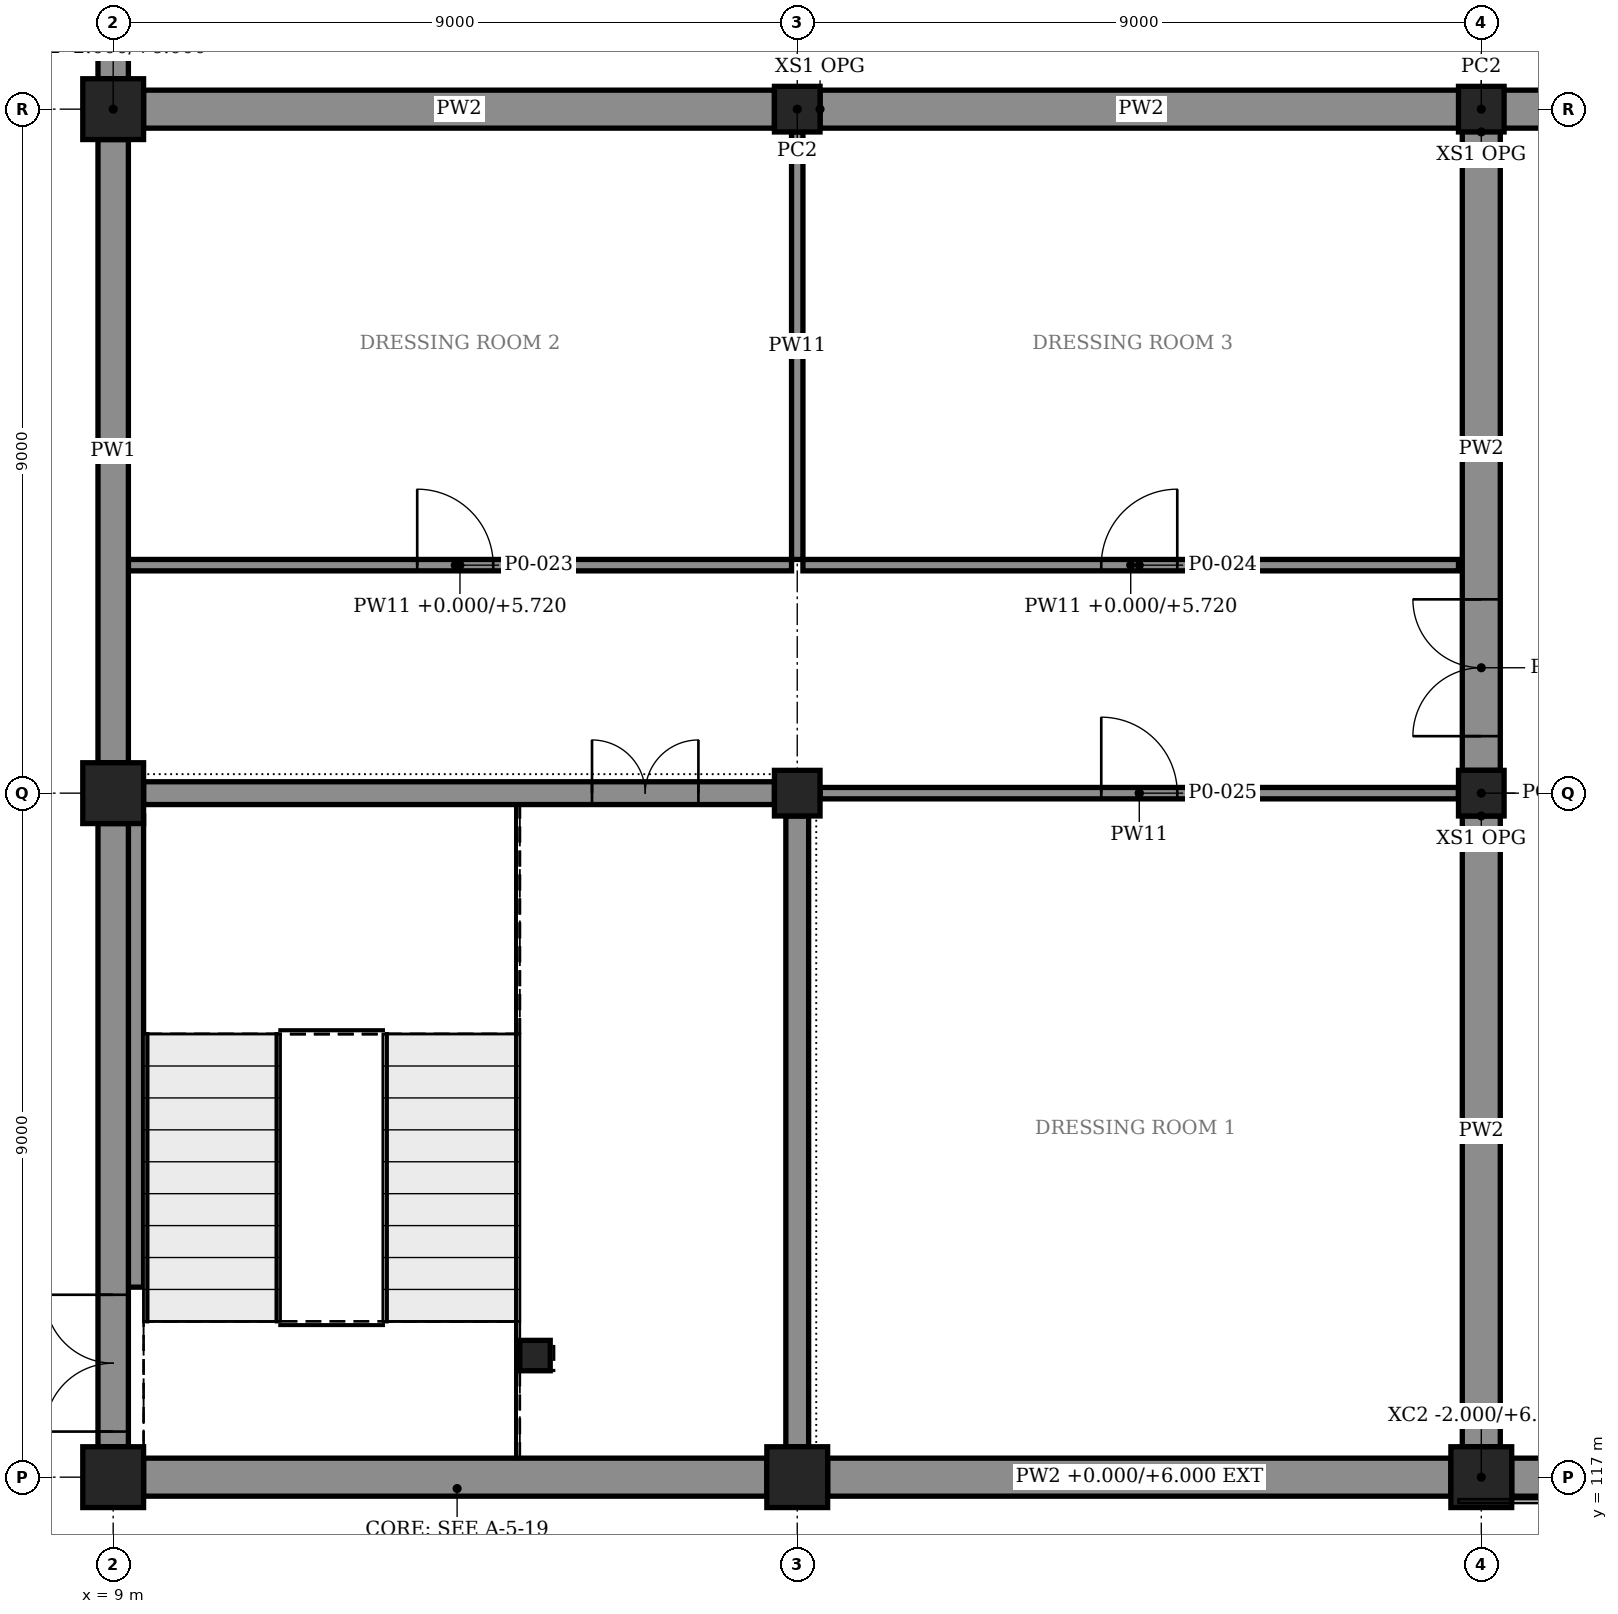
"""IFC4 building model, lengths in metres.
Left out: names, types, materials, properties, quantities, classifications, styles, units other than length and angle.
Written with IfcOpenShell. Run it as: python <this file> out.ifc"""

import sys

from ifc_helpers import new_model, si_unit, direction, frame, frame_2d, origin, origin_2d, place, context, subcontext, project, spatial, polyline, rectangle, outline, extrude, element, fill, save


model = new_model("IFC4")
c1 = context("Model", 3, precision=1e-05, world=origin(), true_north=direction((0.0, 1.0)))
c2 = subcontext(c1, "Body", "Model", "MODEL_VIEW")
j1 = project(units=[si_unit("LENGTHUNIT", "METRE"), si_unit("PLANEANGLEUNIT", "RADIAN")], contexts=[c1])
p1 = place(None, origin())
s1 = spatial("IfcSite", under=j1, at=p1, CompositionType="ELEMENT")
p2 = place(p1, origin())
s2 = spatial("IfcBuilding", under=s1, at=p2, CompositionType="ELEMENT")
p3 = place(p2, origin())
s3 = spatial("IfcBuildingStorey", under=s2, at=p3, CompositionType="ELEMENT", Elevation=0.0)
for number, where, z_axis, x_axis in (
    (1, (9.0, 117.0, -2.0), (0.0, 0.0, 1.0), (1.0, 0.0, 0.0)),
    (2, (18.0, 117.0, -2.0), (0.0, 0.0, 1.0), (1.0, 0.0, 0.0)),
    (3, (27.0, 117.0, -2.0), (0.0, 0.0, 1.0), (1.0, 0.0, 0.0)),
    (4, (9.0, 126.0, -2.0), (0.0, 0.0, 1.0), (1.0, 0.0, 0.0)),
):
    element("IfcColumn", number, at=place(p3, frame(where, z_axis=z_axis, x_axis=x_axis)), inside=s3, PredefinedType="COLUMN", context=c2, shape_type="SweptSolid", body=[
        extrude(rectangle(XDim=0.8, YDim=0.8, at=origin_2d()), origin(), (0.0, 0.0, 1.0), 8.0),
    ])
for number, where, z_axis, x_axis in (
    (5, (18.0, 126.0, -2.0), (0.0, 0.0, 1.0), (1.0, 0.0, 0.0)),
    (6, (27.0, 126.0, -2.0), (0.0, 0.0, 1.0), (1.0, 0.0, 0.0)),
):
    element("IfcColumn", number, at=place(p3, frame(where, z_axis=z_axis, x_axis=x_axis)), inside=s3, PredefinedType="COLUMN", context=c2, shape_type="SweptSolid", body=[
        extrude(rectangle(XDim=0.6, YDim=0.6, at=origin_2d()), origin(), (0.0, 0.0, 1.0), 8.0),
    ])
p4 = place(p3, frame((9.0, 135.0, -2.0), z_axis=(0.0, 0.0, 1.0), x_axis=(1.0, 0.0, 0.0)))
e7 = element("IfcColumn", 7, at=p4, inside=s3, PredefinedType="COLUMN", context=c2, shape_type="SweptSolid", body=[
    extrude(rectangle(XDim=0.8, YDim=0.8, at=origin_2d()), origin(), (0.0, 0.0, 1.0), 8.0),
])
for number, where, z_axis, x_axis in (
    (8, (18.0, 135.0, -2.0), (0.0, 0.0, 1.0), (1.0, 0.0, 0.0)),
    (9, (27.0, 135.0, -2.0), (0.0, 0.0, 1.0), (1.0, 0.0, 0.0)),
):
    element("IfcColumn", number, at=place(p3, frame(where, z_axis=z_axis, x_axis=x_axis)), inside=s3, PredefinedType="COLUMN", context=c2, shape_type="SweptSolid", body=[
        extrude(rectangle(XDim=0.6, YDim=0.6, at=origin_2d()), origin(), (0.0, 0.0, 1.0), 8.0),
    ])
p5 = place(p3, frame((14.55, 118.6, -0.3), z_axis=(0.0, 0.0, 1.0), x_axis=(1.0, 0.0, 0.0)))
e10 = element("IfcColumn", 10, at=p5, inside=s3, PredefinedType="COLUMN", context=c2, shape_type="SweptSolid", body=[
    extrude(rectangle(XDim=0.4, YDim=0.4, at=origin_2d()), origin(), (0.0, 0.0, 1.0), 6.3),
])
p6 = place(p3, frame((9.0, 117.4, 0.0), z_axis=(0.0, 0.0, 1.0), x_axis=(0.0, 1.0, 0.0)))
e11 = element("IfcWall", 11, at=p6, inside=s3, PredefinedType="SOLIDWALL", context=c2, shape_type="SweptSolid", body=[
    extrude(rectangle(XDim=8.2, YDim=0.4, at=frame_2d((4.1, 0.0))), origin(), (0.0, 0.0, 1.0), 6.0),
])
p7 = place(p6, frame((0.2, 0.0, 0.0)))
e12 = element("IfcOpeningElement", 12, at=p7, cuts=e11, PredefinedType="OPENING", context=c2, shape_type="SweptSolid", body=[
    extrude(rectangle(XDim=1.8, YDim=2.4, at=frame_2d((0.9, 1.2))), frame((0.0, 0.21, 0.0), z_axis=(0.0, -1.0, 0.0), x_axis=(1.0, 0.0, 0.0)), (0.0, 0.0, 1.0), 0.42),
])
p8 = place(p3, frame((9.0, 126.4, 0.0), z_axis=(0.0, 0.0, 1.0), x_axis=(0.0, 1.0, 0.0)))
e13 = element("IfcWall", 13, at=p8, inside=s3, PredefinedType="SOLIDWALL", context=c2, shape_type="SweptSolid", body=[
    extrude(rectangle(XDim=8.2, YDim=0.4, at=frame_2d((4.1, 0.0))), origin(), (0.0, 0.0, 1.0), 6.0),
])
p9 = place(p3, frame((9.0, 135.4, -1.2), z_axis=(0.0, 0.0, 1.0), x_axis=(0.0, 1.0, 0.0)))
e14 = element("IfcWall", 14, at=p9, inside=s3, PredefinedType="SOLIDWALL", context=c2, shape_type="SweptSolid", body=[
    extrude(rectangle(XDim=8.2, YDim=0.4, at=frame_2d((4.1, 0.0))), origin(), (0.0, 0.0, 1.0), 7.2),
])
for number, where, z_axis, x_axis in (
    (15, (9.4, 117.0, 0.0), (0.0, 0.0, 1.0), (1.0, 0.0, 0.0)),
    (16, (18.4, 117.0, 0.0), (0.0, 0.0, 1.0), (1.0, 0.0, 0.0)),
):
    element("IfcWall", number, at=place(p3, frame(where, z_axis=z_axis, x_axis=x_axis)), inside=s3, PredefinedType="SOLIDWALL", context=c2, shape_type="SweptSolid", body=[
        extrude(rectangle(XDim=8.2, YDim=0.5, at=frame_2d((4.1, 0.0))), origin(), (0.0, 0.0, 1.0), 6.0),
    ])
p10 = place(p3, frame((27.4, 117.0, 0.0), z_axis=(0.0, 0.0, 1.0), x_axis=(1.0, 0.0, 0.0)))
e17 = element("IfcWall", 17, at=p10, inside=s3, PredefinedType="SOLIDWALL", context=c2, shape_type="SweptSolid", body=[
    extrude(rectangle(XDim=8.2, YDim=0.5, at=frame_2d((4.1, 0.0))), origin(), (0.0, 0.0, 1.0), 6.0),
])
p11 = place(p10, frame((1.7, 0.0, 0.0)))
e18 = element("IfcOpeningElement", 18, at=p11, cuts=e17, PredefinedType="OPENING", context=c2, shape_type="SweptSolid", body=[
    extrude(rectangle(XDim=4.8, YDim=4.5, at=frame_2d((2.4, 2.25))), frame((0.0, 0.26, 0.0), z_axis=(0.0, -1.0, 0.0), x_axis=(1.0, 0.0, 0.0)), (0.0, 0.0, 1.0), 0.52),
])
p12 = place(p3, frame((9.4, 135.0, 0.0), z_axis=(0.0, 0.0, 1.0), x_axis=(1.0, 0.0, 0.0)))
e19 = element("IfcWall", 19, at=p12, inside=s3, PredefinedType="SOLIDWALL", context=c2, shape_type="SweptSolid", body=[
    extrude(rectangle(XDim=8.3, YDim=0.5, at=frame_2d((4.15, 0.0))), origin(), (0.0, 0.0, 1.0), 4.82),
])
p13 = place(p3, frame((18.3, 135.0, 0.0), z_axis=(0.0, 0.0, 1.0), x_axis=(1.0, 0.0, 0.0)))
e20 = element("IfcWall", 20, at=p13, inside=s3, PredefinedType="SOLIDWALL", context=c2, shape_type="SweptSolid", body=[
    extrude(rectangle(XDim=8.45, YDim=0.5, at=frame_2d((4.225, 0.0))), origin(), (0.0, 0.0, 1.0), 4.82),
])
p14 = place(p3, frame((26.75, 135.0, 0.0), z_axis=(0.0, 0.0, 1.0), x_axis=(1.0, 0.0, 0.0)))
e21 = element("IfcWall", 21, at=p14, inside=s3, PredefinedType="SOLIDWALL", context=c2, shape_type="SweptSolid", body=[
    extrude(outline(polyline([(0.0, 0.0), (27.5, 0.0), (27.5, 21.9), (27.25, 22.04), (18.25, 23.183), (9.25, 23.183), (0.25, 22.04), (0.0, 21.9), (0.0, 0.0)])), frame((0.0, 0.25, 0.0), z_axis=(0.0, -1.0, 0.0), x_axis=(1.0, 0.0, 0.0)), (0.0, 0.0, 1.0), 0.5),
])
p15 = place(p14, frame((4.75, 0.0, 0.0)))
e22 = element("IfcOpeningElement", 22, at=p15, cuts=e21, PredefinedType="OPENING", context=c2, shape_type="SweptSolid", body=[
    extrude(rectangle(XDim=18.0, YDim=9.0, at=frame_2d((9.0, 4.5))), frame((0.0, 0.26, 0.0), z_axis=(0.0, -1.0, 0.0), x_axis=(1.0, 0.0, 0.0)), (0.0, 0.0, 1.0), 0.52),
])
p16 = place(p3, frame((27.0, 117.4, 0.0), z_axis=(0.0, 0.0, 1.0), x_axis=(0.0, 1.0, 0.0)))
e23 = element("IfcWall", 23, at=p16, inside=s3, PredefinedType="SOLIDWALL", context=c2, shape_type="SweptSolid", body=[
    extrude(rectangle(XDim=8.3, YDim=0.5, at=frame_2d((4.15, 0.0))), origin(), (0.0, 0.0, 1.0), 4.82),
])
p17 = place(p3, frame((27.0, 126.3, 0.0), z_axis=(0.0, 0.0, 1.0), x_axis=(0.0, 1.0, 0.0)))
e24 = element("IfcWall", 24, at=p17, inside=s3, PredefinedType="SOLIDWALL", context=c2, shape_type="SweptSolid", body=[
    extrude(rectangle(XDim=8.45, YDim=0.5, at=frame_2d((4.225, 0.0))), origin(), (0.0, 0.0, 1.0), 4.82),
])
p18 = place(p17, frame((0.45, 0.0, 0.0)))
e25 = element("IfcOpeningElement", 25, at=p18, cuts=e24, PredefinedType="OPENING", context=c2, shape_type="SweptSolid", body=[
    extrude(rectangle(XDim=1.8, YDim=2.4, at=frame_2d((0.9, 1.2))), frame((0.0, 0.26, 0.0), z_axis=(0.0, -1.0, 0.0), x_axis=(1.0, 0.0, 0.0)), (0.0, 0.0, 1.0), 0.52),
])
p19 = place(p3, frame((18.0, 117.4, 0.0), z_axis=(0.0, 0.0, 1.0), x_axis=(0.0, 1.0, 0.0)))
e26 = element("IfcWall", 26, at=p19, inside=s3, PredefinedType="SOLIDWALL", context=c2, shape_type="SweptSolid", body=[
    extrude(rectangle(XDim=8.3, YDim=0.3, at=frame_2d((4.15, 0.0))), origin(), (0.0, 0.0, 1.0), 4.82),
])
p20 = place(p3, frame((9.4, 126.0, 0.0), z_axis=(0.0, 0.0, 1.0), x_axis=(1.0, 0.0, 0.0)))
e27 = element("IfcWall", 27, at=p20, inside=s3, PredefinedType="SOLIDWALL", context=c2, shape_type="SweptSolid", body=[
    extrude(rectangle(XDim=8.3, YDim=0.3, at=frame_2d((4.15, 0.0))), origin(), (0.0, 0.0, 1.0), 4.82),
])
p21 = place(p20, frame((5.9, 0.0, 0.0)))
e28 = element("IfcOpeningElement", 28, at=p21, cuts=e27, PredefinedType="OPENING", context=c2, shape_type="SweptSolid", body=[
    extrude(rectangle(XDim=1.4, YDim=2.4, at=frame_2d((0.7, 1.2))), frame((0.0, 0.16, 0.0), z_axis=(0.0, -1.0, 0.0), x_axis=(1.0, 0.0, 0.0)), (0.0, 0.0, 1.0), 0.32),
])
p22 = place(p3, frame((9.3, 119.5, 0.0), z_axis=(0.0, 0.0, 1.0), x_axis=(0.0, 1.0, 0.0)))
e29 = element("IfcWall", 29, at=p22, inside=s3, PredefinedType="SOLIDWALL", context=c2, shape_type="SweptSolid", body=[
    extrude(rectangle(XDim=6.2, YDim=0.2, at=frame_2d((3.1, 0.0))), origin(), (0.0, 0.0, 1.0), 5.72),
])
p23 = place(p3, frame((9.2, 129.0, 0.0), z_axis=(0.0, 0.0, 1.0), x_axis=(1.0, 0.0, 0.0)))
e30 = element("IfcWall", 30, at=p23, inside=s3, PredefinedType="PARTITIONING", context=c2, shape_type="SweptSolid", body=[
    extrude(rectangle(XDim=8.725, YDim=0.15, at=frame_2d((4.363, 0.0))), origin(), (0.0, 0.0, 1.0), 5.72),
])
p24 = place(p23, frame((3.8, 0.0, 0.0)))
e31 = element("IfcOpeningElement", 31, at=p24, cuts=e30, PredefinedType="OPENING", context=c2, shape_type="SweptSolid", body=[
    extrude(rectangle(XDim=1.0, YDim=2.4, at=frame_2d((0.5, 1.2))), frame((0.0, 0.085, 0.0), z_axis=(0.0, -1.0, 0.0), x_axis=(1.0, 0.0, 0.0)), (0.0, 0.0, 1.0), 0.17),
])
p25 = place(p3, frame((18.075, 129.0, 0.0), z_axis=(0.0, 0.0, 1.0), x_axis=(1.0, 0.0, 0.0)))
e32 = element("IfcWall", 32, at=p25, inside=s3, PredefinedType="PARTITIONING", context=c2, shape_type="SweptSolid", body=[
    extrude(rectangle(XDim=8.625, YDim=0.15, at=frame_2d((4.312, 0.0))), origin(), (0.0, 0.0, 1.0), 5.72),
])
p26 = place(p25, frame((3.925, 0.0, 0.0)))
e33 = element("IfcOpeningElement", 33, at=p26, cuts=e32, PredefinedType="OPENING", context=c2, shape_type="SweptSolid", body=[
    extrude(rectangle(XDim=1.0, YDim=2.4, at=frame_2d((0.5, 1.2))), frame((0.0, 0.085, 0.0), z_axis=(0.0, -1.0, 0.0), x_axis=(1.0, 0.0, 0.0)), (0.0, 0.0, 1.0), 0.17),
])
p27 = place(p3, frame((18.0, 129.075, 0.0), z_axis=(0.0, 0.0, 1.0), x_axis=(0.0, 1.0, 0.0)))
e34 = element("IfcWall", 34, at=p27, inside=s3, PredefinedType="PARTITIONING", context=c2, shape_type="SweptSolid", body=[
    extrude(rectangle(XDim=5.625, YDim=0.15, at=frame_2d((2.812, 0.0))), origin(), (0.0, 0.0, 1.0), 4.82),
])
p28 = place(p3, frame((18.3, 126.0, 0.0), z_axis=(0.0, 0.0, 1.0), x_axis=(1.0, 0.0, 0.0)))
e35 = element("IfcWall", 35, at=p28, inside=s3, PredefinedType="PARTITIONING", context=c2, shape_type="SweptSolid", body=[
    extrude(rectangle(XDim=8.4, YDim=0.15, at=frame_2d((4.2, 0.0))), origin(), (0.0, 0.0, 1.0), 4.82),
])
p29 = place(p28, frame((3.7, 0.0, 0.0)))
e36 = element("IfcOpeningElement", 36, at=p29, cuts=e35, PredefinedType="OPENING", context=c2, shape_type="SweptSolid", body=[
    extrude(rectangle(XDim=1.0, YDim=2.4, at=frame_2d((0.5, 1.2))), frame((0.0, 0.085, 0.0), z_axis=(0.0, -1.0, 0.0), x_axis=(1.0, 0.0, 0.0)), (0.0, 0.0, 1.0), 0.17),
])
p30 = place(p7, origin())
e37 = element("IfcDoor", 37, at=p30, inside=s3, OperationType="DOUBLE_DOOR_SINGLE_SWING", PredefinedType="DOOR", context=c2, shape_type="SweptSolid", body=[
    extrude(rectangle(XDim=1.8, YDim=2.4, at=frame_2d((0.9, 1.2))), frame((0.0, 0.025, 0.0), z_axis=(0.0, -1.0, 0.0), x_axis=(1.0, 0.0, 0.0)), (0.0, 0.0, 1.0), 0.05),
])
fill(e12, e37)
p31 = place(p21, origin())
e38 = element("IfcDoor", 38, at=p31, inside=s3, OperationType="SINGLE_SWING_LEFT", PredefinedType="DOOR", context=c2, shape_type="SweptSolid", body=[
    extrude(rectangle(XDim=1.4, YDim=2.4, at=frame_2d((0.7, 1.2))), frame((0.0, 0.025, 0.0), z_axis=(0.0, -1.0, 0.0), x_axis=(1.0, 0.0, 0.0)), (0.0, 0.0, 1.0), 0.05),
])
fill(e28, e38)
p32 = place(p24, origin())
e39 = element("IfcDoor", 39, at=p32, inside=s3, OperationType="SINGLE_SWING_LEFT", PredefinedType="DOOR", context=c2, shape_type="SweptSolid", body=[
    extrude(rectangle(XDim=1.0, YDim=2.4, at=frame_2d((0.5, 1.2))), frame((0.0, 0.025, 0.0), z_axis=(0.0, -1.0, 0.0), x_axis=(1.0, 0.0, 0.0)), (0.0, 0.0, 1.0), 0.05),
])
fill(e31, e39)
p33 = place(p26, origin())
e40 = element("IfcDoor", 40, at=p33, inside=s3, OperationType="SINGLE_SWING_RIGHT", PredefinedType="DOOR", context=c2, shape_type="SweptSolid", body=[
    extrude(rectangle(XDim=1.0, YDim=2.4, at=frame_2d((0.5, 1.2))), frame((0.0, 0.025, 0.0), z_axis=(0.0, -1.0, 0.0), x_axis=(1.0, 0.0, 0.0)), (0.0, 0.0, 1.0), 0.05),
])
fill(e33, e40)
p34 = place(p29, origin())
e41 = element("IfcDoor", 41, at=p34, inside=s3, OperationType="SINGLE_SWING_LEFT", PredefinedType="DOOR", context=c2, shape_type="SweptSolid", body=[
    extrude(rectangle(XDim=1.0, YDim=2.4, at=frame_2d((0.5, 1.2))), frame((0.0, 0.025, 0.0), z_axis=(0.0, -1.0, 0.0), x_axis=(1.0, 0.0, 0.0)), (0.0, 0.0, 1.0), 0.05),
])
fill(e36, e41)
p35 = place(p18, origin())
e42 = element("IfcDoor", 42, at=p35, inside=s3, OperationType="SINGLE_SWING_LEFT", PredefinedType="DOOR", context=c2, shape_type="SweptSolid", body=[
    extrude(rectangle(XDim=1.8, YDim=2.4, at=frame_2d((0.9, 1.2))), frame((0.0, 0.025, 0.0), z_axis=(0.0, -1.0, 0.0), x_axis=(1.0, 0.0, 0.0)), (0.0, 0.0, 1.0), 0.05),
])
fill(e25, e42)
save(model, sys.argv[1])
